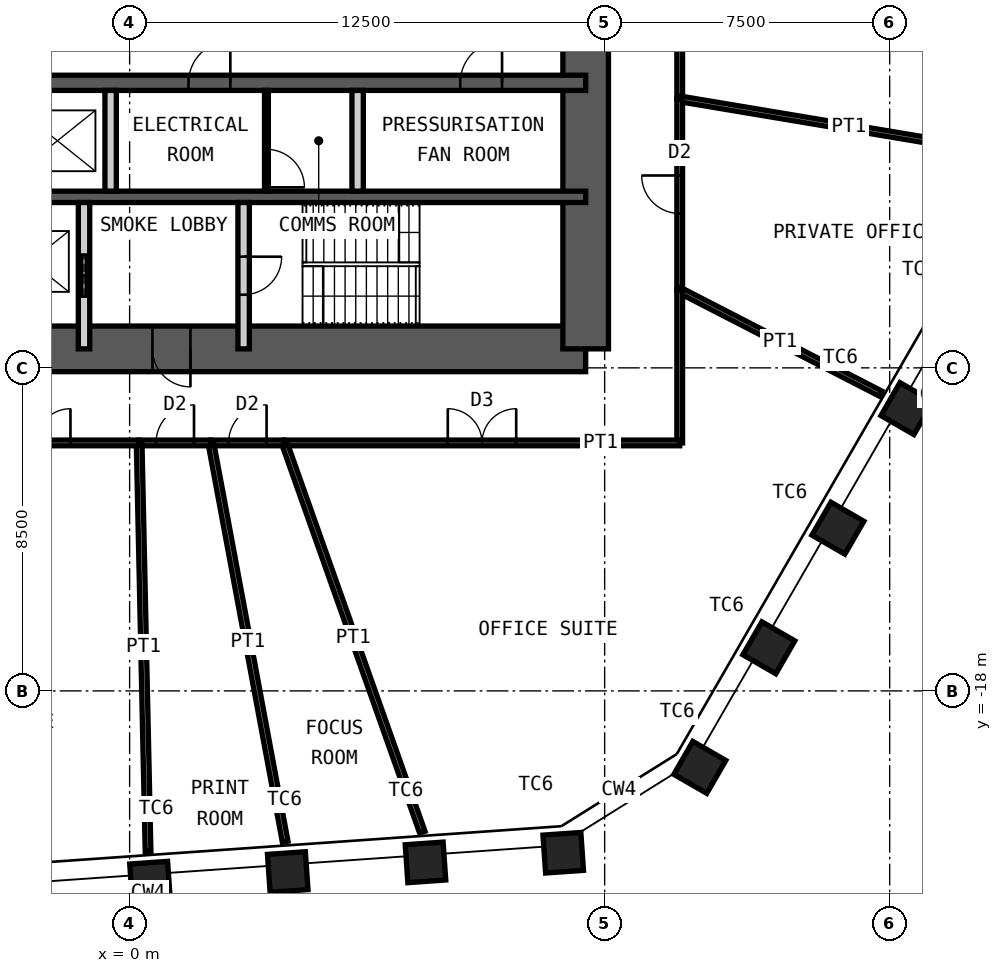
"""IFC4 building model, lengths in metres.
Left out: names, types, materials, properties, quantities, classifications, styles, units other than length and angle.
Written with IfcOpenShell. Run it as: python <this file> out.ifc"""

import sys

from ifc_helpers import new_model, si_unit, direction, frame, frame_2d, origin, origin_2d, place, context, subcontext, project, spatial, rectangle, hollow_rectangle, extrude, element, fill, save


model = new_model("IFC4")
c1 = context("Model", 3, precision=1e-05, world=origin(), true_north=direction((0.0, 1.0)))
c2 = subcontext(c1, "Body", "Model", "MODEL_VIEW")
j1 = project(units=[si_unit("LENGTHUNIT", "METRE"), si_unit("PLANEANGLEUNIT", "RADIAN")], contexts=[c1])
p1 = place(None, origin())
s1 = spatial("IfcSite", under=j1, at=p1, CompositionType="ELEMENT")
p2 = place(p1, origin())
s2 = spatial("IfcBuilding", under=s1, at=p2, CompositionType="ELEMENT")
p3 = place(p2, frame((0.0, 0.0, 222.4)))
s3 = spatial("IfcBuildingStorey", under=s2, at=p3, CompositionType="ELEMENT", Elevation=222.4)
for number, where, z_axis, x_axis in (
    (1, (20.454, -10.572, 0.0), (0.0, 0.0, 1.0), (0.5, 0.866, 0.0)),
    (2, (18.637, -13.719, 0.0), (0.0, 0.0, 1.0), (0.5, 0.866, 0.0)),
    (3, (16.821, -16.866, 0.0), (0.0, 0.0, 1.0), (0.5, 0.866, 0.0)),
    (4, (15.004, -20.012, 0.0), (0.0, 0.0, 1.0), (0.5, 0.866, 0.0)),
    (5, (11.41, -22.258, 0.0), (0.0, 0.0, 1.0), (0.998, 0.07, 0.0)),
    (6, (7.785, -22.512, 0.0), (0.0, 0.0, 1.0), (0.998, 0.07, 0.0)),
    (7, (4.16, -22.765, 0.0), (0.0, 0.0, 1.0), (0.998, 0.07, 0.0)),
    (8, (0.536, -23.019, 0.0), (0.0, 0.0, 1.0), (0.998, 0.07, 0.0)),
):
    element("IfcColumn", number, at=place(p3, frame(where, z_axis=z_axis, x_axis=x_axis)), inside=s3, PredefinedType="COLUMN", context=c2, shape_type="SweptSolid", body=[
        extrude(hollow_rectangle(XDim=1.0, YDim=1.0, WallThickness=0.06, at=origin_2d()), origin(), (0.0, 0.0, 1.0), 4.2),
    ])
p4 = place(p3, frame((-12.0, -9.0, 0.0), z_axis=(0.0, 0.0, 1.0), x_axis=(1.0, 0.0, 0.0)))
e9 = element("IfcWall", 9, at=p4, inside=s3, PredefinedType="SHEAR", context=c2, shape_type="SweptSolid", body=[
    extrude(rectangle(XDim=24.0, YDim=1.2, at=frame_2d((12.0, 0.0))), origin(), (0.0, 0.0, 1.0), 4.2),
])
p5 = place(p4, frame((1.35, 0.0, 0.0)))
e10 = element("IfcOpeningElement", 10, at=p5, cuts=e9, PredefinedType="OPENING", context=c2, shape_type="SweptSolid", body=[
    extrude(rectangle(XDim=1.0, YDim=2.1, at=frame_2d((0.5, 1.05))), frame((0.0, 0.61, 0.0), z_axis=(0.0, -1.0, 0.0), x_axis=(1.0, 0.0, 0.0)), (0.0, 0.0, 1.0), 1.22),
])
p6 = place(p4, frame((5.325, 0.0, 0.0)))
e11 = element("IfcOpeningElement", 11, at=p6, cuts=e9, PredefinedType="OPENING", context=c2, shape_type="SweptSolid", body=[
    extrude(rectangle(XDim=1.15, YDim=2.1, at=frame_2d((0.575, 1.05))), frame((0.0, 0.61, 0.0), z_axis=(0.0, -1.0, 0.0), x_axis=(1.0, 0.0, 0.0)), (0.0, 0.0, 1.0), 1.22),
])
p7 = place(p4, frame((12.6, 0.0, 0.0)))
e12 = element("IfcOpeningElement", 12, at=p7, cuts=e9, PredefinedType="OPENING", context=c2, shape_type="SweptSolid", body=[
    extrude(rectangle(XDim=1.0, YDim=2.1, at=frame_2d((0.5, 1.05))), frame((0.0, 0.61, 0.0), z_axis=(0.0, -1.0, 0.0), x_axis=(1.0, 0.0, 0.0)), (0.0, 0.0, 1.0), 1.22),
])
p8 = place(p3, frame((12.0, -9.0, 0.0), z_axis=(0.0, 0.0, 1.0), x_axis=(0.0, 1.0, 0.0)))
e13 = element("IfcWall", 13, at=p8, inside=s3, PredefinedType="SHEAR", context=c2, shape_type="SweptSolid", body=[
    extrude(rectangle(XDim=18.0, YDim=1.2, at=frame_2d((9.0, 0.0))), origin(), (0.0, 0.0, 1.0), 4.2),
])
p9 = place(p8, frame((8.1, 0.0, 0.0)))
e14 = element("IfcOpeningElement", 14, at=p9, cuts=e13, PredefinedType="OPENING", context=c2, shape_type="SweptSolid", body=[
    extrude(rectangle(XDim=1.8, YDim=2.1, at=frame_2d((0.9, 1.05))), frame((0.0, 0.61, 0.0), z_axis=(0.0, -1.0, 0.0), x_axis=(1.0, 0.0, 0.0)), (0.0, 0.0, 1.0), 1.22),
])
p10 = place(p3, frame((-12.0, -2.0, 0.0), z_axis=(0.0, 0.0, 1.0), x_axis=(1.0, 0.0, 0.0)))
e15 = element("IfcWall", 15, at=p10, inside=s3, PredefinedType="SHEAR", context=c2, shape_type="SweptSolid", body=[
    extrude(rectangle(XDim=24.0, YDim=0.4, at=frame_2d((12.0, 0.0))), origin(), (0.0, 0.0, 1.0), 4.2),
])
p11 = place(p10, frame((1.1, 0.0, 0.0)))
e16 = element("IfcOpeningElement", 16, at=p11, cuts=e15, PredefinedType="OPENING", context=c2, shape_type="SweptSolid", body=[
    extrude(rectangle(XDim=1.1, YDim=2.1, at=frame_2d((0.55, 1.05))), frame((0.0, 0.21, 0.0), z_axis=(0.0, -1.0, 0.0), x_axis=(1.0, 0.0, 0.0)), (0.0, 0.0, 1.0), 0.42),
])
p12 = place(p10, frame((13.55, 0.0, 0.0)))
e17 = element("IfcOpeningElement", 17, at=p12, cuts=e15, PredefinedType="OPENING", context=c2, shape_type="SweptSolid", body=[
    extrude(rectangle(XDim=1.1, YDim=2.1, at=frame_2d((0.55, 1.05))), frame((0.0, 0.21, 0.0), z_axis=(0.0, -1.0, 0.0), x_axis=(1.0, 0.0, 0.0)), (0.0, 0.0, 1.0), 0.42),
])
p13 = place(p10, frame((20.7, 0.0, 0.0)))
e18 = element("IfcOpeningElement", 18, at=p13, cuts=e15, PredefinedType="OPENING", context=c2, shape_type="SweptSolid", body=[
    extrude(rectangle(XDim=1.1, YDim=2.1, at=frame_2d((0.55, 1.05))), frame((0.0, 0.21, 0.0), z_axis=(0.0, -1.0, 0.0), x_axis=(1.0, 0.0, 0.0)), (0.0, 0.0, 1.0), 0.42),
])
p14 = place(p10, frame((4.0, 0.0, 0.0)))
e19 = element("IfcOpeningElement", 19, at=p14, cuts=e15, PredefinedType="OPENING", context=c2, shape_type="SweptSolid", body=[
    extrude(rectangle(XDim=1.0, YDim=2.1, at=frame_2d((0.5, 1.05))), frame((0.0, 0.21, 0.0), z_axis=(0.0, -1.0, 0.0), x_axis=(1.0, 0.0, 0.0)), (0.0, 0.0, 1.0), 0.42),
])
p15 = place(p10, frame((6.8, 0.0, 0.0)))
e20 = element("IfcOpeningElement", 20, at=p15, cuts=e15, PredefinedType="OPENING", context=c2, shape_type="SweptSolid", body=[
    extrude(rectangle(XDim=1.0, YDim=2.1, at=frame_2d((0.5, 1.05))), frame((0.0, 0.21, 0.0), z_axis=(0.0, -1.0, 0.0), x_axis=(1.0, 0.0, 0.0)), (0.0, 0.0, 1.0), 0.42),
])
p16 = place(p3, frame((-12.0, -5.0, 0.0), z_axis=(0.0, 0.0, 1.0), x_axis=(1.0, 0.0, 0.0)))
e21 = element("IfcWall", 21, at=p16, inside=s3, PredefinedType="SHEAR", context=c2, shape_type="SweptSolid", body=[
    extrude(rectangle(XDim=24.0, YDim=0.3, at=frame_2d((12.0, 0.0))), origin(), (0.0, 0.0, 1.0), 4.2),
])
for number, where, z_axis, x_axis in (
    (22, (-0.5, -4.85, 0.0), (0.0, 0.0, 1.0), (0.0, 1.0, 0.0)),
    (23, (6.0, -4.85, 0.0), (0.0, 0.0, 1.0), (0.0, 1.0, 0.0)),
):
    element("IfcWall", number, at=place(p3, frame(where, z_axis=z_axis, x_axis=x_axis)), inside=s3, PredefinedType="PARTITIONING", context=c2, shape_type="SweptSolid", body=[
        extrude(rectangle(XDim=2.65, YDim=0.3, at=frame_2d((1.325, 0.0))), origin(), (0.0, 0.0, 1.0), 3.98),
    ])
p17 = place(p3, frame((-1.2, -9.0, 0.0), z_axis=(0.0, 0.0, 1.0), x_axis=(0.0, 1.0, 0.0)))
e24 = element("IfcWall", 24, at=p17, inside=s3, PredefinedType="PARTITIONING", context=c2, shape_type="SweptSolid", body=[
    extrude(rectangle(XDim=3.85, YDim=0.3, at=frame_2d((1.925, 0.0))), origin(), (0.0, 0.0, 1.0), 3.98),
])
p18 = place(p17, frame((1.375, 0.0, 0.0)))
e25 = element("IfcOpeningElement", 25, at=p18, cuts=e24, PredefinedType="OPENING", context=c2, shape_type="SweptSolid", body=[
    extrude(rectangle(XDim=1.1, YDim=2.4, at=frame_2d((0.55, 1.2))), frame((0.0, 0.16, 0.0), z_axis=(0.0, -1.0, 0.0), x_axis=(1.0, 0.0, 0.0)), (0.0, 0.0, 1.0), 0.32),
])
p19 = place(p3, frame((3.0, -9.0, 0.0), z_axis=(0.0, 0.0, 1.0), x_axis=(0.0, 1.0, 0.0)))
e26 = element("IfcWall", 26, at=p19, inside=s3, PredefinedType="PARTITIONING", context=c2, shape_type="SweptSolid", body=[
    extrude(rectangle(XDim=3.85, YDim=0.3, at=frame_2d((1.925, 0.0))), origin(), (0.0, 0.0, 1.0), 3.98),
])
p20 = place(p19, frame((1.425, 0.0, 0.0)))
e27 = element("IfcOpeningElement", 27, at=p20, cuts=e26, PredefinedType="OPENING", context=c2, shape_type="SweptSolid", body=[
    extrude(rectangle(XDim=1.0, YDim=2.1, at=frame_2d((0.5, 1.05))), frame((0.0, 0.16, 0.0), z_axis=(0.0, -1.0, 0.0), x_axis=(1.0, 0.0, 0.0)), (0.0, 0.0, 1.0), 0.32),
])
p21 = place(p3, frame((3.6, -4.85, 0.0), z_axis=(0.0, 0.0, 1.0), x_axis=(0.0, 1.0, 0.0)))
e28 = element("IfcWall", 28, at=p21, inside=s3, PredefinedType="PARTITIONING", context=c2, shape_type="SweptSolid", body=[
    extrude(rectangle(XDim=2.65, YDim=0.1, at=frame_2d((1.325, 0.0))), origin(), (0.0, 0.0, 1.0), 3.98),
])
p22 = place(p21, frame((0.1, 0.0, 0.0)))
e29 = element("IfcOpeningElement", 29, at=p22, cuts=e28, PredefinedType="OPENING", context=c2, shape_type="SweptSolid", body=[
    extrude(rectangle(XDim=1.0, YDim=2.4, at=frame_2d((0.5, 1.2))), frame((0.0, 0.06, 0.0), z_axis=(0.0, -1.0, 0.0), x_axis=(1.0, 0.0, 0.0)), (0.0, 0.0, 1.0), 0.12),
])
p23 = place(p3, frame((14.475, 3.475, 0.0), z_axis=(0.0, 0.0, 1.0), x_axis=(0.0, -1.0, 0.0)))
e30 = element("IfcWall", 30, at=p23, inside=s3, PredefinedType="PARTITIONING", context=c2, shape_type="SweptSolid", body=[
    extrude(rectangle(XDim=5.896, YDim=0.15, at=frame_2d((2.948, 0.0))), origin(), (0.0, 0.0, 1.0), 4.03),
])
p24 = place(p23, frame((2.448, 0.0, 0.0)))
e31 = element("IfcOpeningElement", 31, at=p24, cuts=e30, PredefinedType="OPENING", context=c2, shape_type="SweptSolid", body=[
    extrude(rectangle(XDim=1.0, YDim=2.4, at=frame_2d((0.5, 1.2))), frame((0.0, 0.085, 0.0), z_axis=(0.0, -1.0, 0.0), x_axis=(1.0, 0.0, 0.0)), (0.0, 0.0, 1.0), 0.17),
])
p25 = place(p3, frame((23.383, -3.912, 0.0), z_axis=(0.0, 0.0, 1.0), x_axis=(-0.986293651891, 0.164999491631, 0.0)))
e32 = element("IfcWall", 32, at=p25, inside=s3, PredefinedType="PARTITIONING", context=c2, shape_type="SweptSolid", body=[
    extrude(rectangle(XDim=9.032, YDim=0.15, at=frame_2d((4.516, 0.0))), origin(), (0.0, 0.0, 1.0), 3.43),
])
p26 = place(p3, frame((14.475, -2.422, 0.0), z_axis=(0.0, 0.0, 1.0), x_axis=(0.0, -1.0, 0.0)))
e33 = element("IfcWall", 33, at=p26, inside=s3, PredefinedType="PARTITIONING", context=c2, shape_type="SweptSolid", body=[
    extrude(rectangle(XDim=5.033, YDim=0.15, at=frame_2d((2.517, 0.0))), origin(), (0.0, 0.0, 1.0), 4.03),
])
p27 = place(p26, frame((2.017, 0.0, 0.0)))
e34 = element("IfcOpeningElement", 34, at=p27, cuts=e33, PredefinedType="OPENING", context=c2, shape_type="SweptSolid", body=[
    extrude(rectangle(XDim=1.0, YDim=2.4, at=frame_2d((0.5, 1.2))), frame((0.0, 0.085, 0.0), z_axis=(0.0, -1.0, 0.0), x_axis=(1.0, 0.0, 0.0)), (0.0, 0.0, 1.0), 0.17),
])
p28 = place(p3, frame((19.759, -10.177, 0.0), z_axis=(0.0, 0.0, 1.0), x_axis=(-0.889015092721, 0.457877893017, 0.0)))
e35 = element("IfcWall", 35, at=p28, inside=s3, PredefinedType="PARTITIONING", context=c2, shape_type="SweptSolid", body=[
    extrude(rectangle(XDim=5.944, YDim=0.15, at=frame_2d((2.972, 0.0))), origin(), (0.0, 0.0, 1.0), 3.43),
])
p29 = place(p3, frame((14.475, -7.455, 0.0), z_axis=(0.0, 0.0, 1.0), x_axis=(0.0, -1.0, 0.0)))
e36 = element("IfcWall", 36, at=p29, inside=s3, PredefinedType="PARTITIONING", context=c2, shape_type="SweptSolid", body=[
    extrude(rectangle(XDim=4.02, YDim=0.15, at=frame_2d((2.01, 0.0))), origin(), (0.0, 0.0, 1.0), 4.03),
])
p30 = place(p3, frame((14.475, -11.475, 0.0), z_axis=(0.0, 0.0, 1.0), x_axis=(-1.0, 0.0, 0.0)))
e37 = element("IfcWall", 37, at=p30, inside=s3, PredefinedType="PARTITIONING", context=c2, shape_type="SweptSolid", body=[
    extrude(rectangle(XDim=10.406, YDim=0.15, at=frame_2d((5.203, 0.0))), origin(), (0.0, 0.0, 1.0), 4.03),
])
p31 = place(p30, frame((4.303, 0.0, 0.0)))
e38 = element("IfcOpeningElement", 38, at=p31, cuts=e37, PredefinedType="OPENING", context=c2, shape_type="SweptSolid", body=[
    extrude(rectangle(XDim=1.8, YDim=2.4, at=frame_2d((0.9, 1.2))), frame((0.0, 0.085, 0.0), z_axis=(0.0, -1.0, 0.0), x_axis=(1.0, 0.0, 0.0)), (0.0, 0.0, 1.0), 0.17),
])
p32 = place(p3, frame((7.703, -21.719, 0.0), z_axis=(0.0, 0.0, 1.0), x_axis=(-0.334269551553, 0.942477515331, 0.0)))
e39 = element("IfcWall", 39, at=p32, inside=s3, PredefinedType="PARTITIONING", context=c2, shape_type="SweptSolid", body=[
    extrude(rectangle(XDim=10.869, YDim=0.15, at=frame_2d((5.435, 0.0))), origin(), (0.0, 0.0, 1.0), 3.43),
])
p33 = place(p3, frame((4.07, -11.475, 0.0), z_axis=(0.0, 0.0, 1.0), x_axis=(-1.0, 0.0, 0.0)))
e40 = element("IfcWall", 40, at=p33, inside=s3, PredefinedType="PARTITIONING", context=c2, shape_type="SweptSolid", body=[
    extrude(rectangle(XDim=1.932, YDim=0.15, at=frame_2d((0.966, 0.0))), origin(), (0.0, 0.0, 1.0), 4.03),
])
p34 = place(p33, frame((0.466, 0.0, 0.0)))
e41 = element("IfcOpeningElement", 41, at=p34, cuts=e40, PredefinedType="OPENING", context=c2, shape_type="SweptSolid", body=[
    extrude(rectangle(XDim=1.0, YDim=2.4, at=frame_2d((0.5, 1.2))), frame((0.0, 0.085, 0.0), z_axis=(0.0, -1.0, 0.0), x_axis=(1.0, 0.0, 0.0)), (0.0, 0.0, 1.0), 0.17),
])
p35 = place(p3, frame((4.093, -21.969, 0.0), z_axis=(0.0, 0.0, 1.0), x_axis=(-0.183180901121, 0.983079222374, 0.0)))
e42 = element("IfcWall", 42, at=p35, inside=s3, PredefinedType="PARTITIONING", context=c2, shape_type="SweptSolid", body=[
    extrude(rectangle(XDim=10.674, YDim=0.15, at=frame_2d((5.337, 0.0))), origin(), (0.0, 0.0, 1.0), 3.43),
])
p36 = place(p3, frame((2.138, -11.475, 0.0), z_axis=(0.0, 0.0, 1.0), x_axis=(-1.0, 0.0, 0.0)))
e43 = element("IfcWall", 43, at=p36, inside=s3, PredefinedType="PARTITIONING", context=c2, shape_type="SweptSolid", body=[
    extrude(rectangle(XDim=1.888, YDim=0.15, at=frame_2d((0.944, 0.0))), origin(), (0.0, 0.0, 1.0), 4.03),
])
p37 = place(p36, frame((0.444, 0.0, 0.0)))
e44 = element("IfcOpeningElement", 44, at=p37, cuts=e43, PredefinedType="OPENING", context=c2, shape_type="SweptSolid", body=[
    extrude(rectangle(XDim=1.0, YDim=2.4, at=frame_2d((0.5, 1.2))), frame((0.0, 0.085, 0.0), z_axis=(0.0, -1.0, 0.0), x_axis=(1.0, 0.0, 0.0)), (0.0, 0.0, 1.0), 0.17),
])
p38 = place(p3, frame((0.485, -22.22, 0.0), z_axis=(0.0, 0.0, 1.0), x_axis=(-0.021806550804, 0.999762208899, 0.0)))
e45 = element("IfcWall", 45, at=p38, inside=s3, PredefinedType="PARTITIONING", context=c2, shape_type="SweptSolid", body=[
    extrude(rectangle(XDim=10.748, YDim=0.15, at=frame_2d((5.374, 0.0))), origin(), (0.0, 0.0, 1.0), 3.43),
])
p39 = place(p3, frame((0.25, -11.475, 0.0), z_axis=(0.0, 0.0, 1.0), x_axis=(-1.0, 0.0, 0.0)))
e46 = element("IfcWall", 46, at=p39, inside=s3, PredefinedType="PARTITIONING", context=c2, shape_type="SweptSolid", body=[
    extrude(rectangle(XDim=5.415, YDim=0.15, at=frame_2d((2.707, 0.0))), origin(), (0.0, 0.0, 1.0), 4.03),
])
p40 = place(p39, frame((1.807, 0.0, 0.0)))
e47 = element("IfcOpeningElement", 47, at=p40, cuts=e46, PredefinedType="OPENING", context=c2, shape_type="SweptSolid", body=[
    extrude(rectangle(XDim=1.8, YDim=2.4, at=frame_2d((0.9, 1.2))), frame((0.0, 0.085, 0.0), z_axis=(0.0, -1.0, 0.0), x_axis=(1.0, 0.0, 0.0)), (0.0, 0.0, 1.0), 0.17),
])
p41 = place(p7, origin())
e48 = element("IfcDoor", 48, at=p41, inside=s3, OperationType="SINGLE_SWING_RIGHT", PredefinedType="DOOR", context=c2, shape_type="SweptSolid", body=[
    extrude(rectangle(XDim=1.0, YDim=2.1, at=frame_2d((0.5, 1.05))), frame((0.0, 0.025, 0.0), z_axis=(0.0, -1.0, 0.0), x_axis=(1.0, 0.0, 0.0)), (0.0, 0.0, 1.0), 0.05),
])
fill(e12, e48)
p42 = place(p20, origin())
e49 = element("IfcDoor", 49, at=p42, inside=s3, OperationType="SINGLE_SWING_RIGHT", PredefinedType="DOOR", context=c2, shape_type="SweptSolid", body=[
    extrude(rectangle(XDim=1.0, YDim=2.1, at=frame_2d((0.5, 1.05))), frame((0.0, 0.025, 0.0), z_axis=(0.0, -1.0, 0.0), x_axis=(1.0, 0.0, 0.0)), (0.0, 0.0, 1.0), 0.05),
])
fill(e27, e49)
p43 = place(p12, origin())
e50 = element("IfcDoor", 50, at=p43, inside=s3, OperationType="SINGLE_SWING_LEFT", PredefinedType="DOOR", context=c2, shape_type="SweptSolid", body=[
    extrude(rectangle(XDim=1.1, YDim=2.1, at=frame_2d((0.55, 1.05))), frame((0.0, 0.025, 0.0), z_axis=(0.0, -1.0, 0.0), x_axis=(1.0, 0.0, 0.0)), (0.0, 0.0, 1.0), 0.05),
])
fill(e17, e50)
p44 = place(p13, origin())
e51 = element("IfcDoor", 51, at=p44, inside=s3, OperationType="SINGLE_SWING_LEFT", PredefinedType="DOOR", context=c2, shape_type="SweptSolid", body=[
    extrude(rectangle(XDim=1.1, YDim=2.1, at=frame_2d((0.55, 1.05))), frame((0.0, 0.025, 0.0), z_axis=(0.0, -1.0, 0.0), x_axis=(1.0, 0.0, 0.0)), (0.0, 0.0, 1.0), 0.05),
])
fill(e18, e51)
p45 = place(p18, origin())
e52 = element("IfcDoor", 52, at=p45, inside=s3, OperationType="DOUBLE_DOOR_SLIDING", PredefinedType="DOOR", context=c2, shape_type="SweptSolid", body=[
    extrude(rectangle(XDim=1.1, YDim=2.4, at=frame_2d((0.55, 1.2))), frame((0.0, 0.025, 0.0), z_axis=(0.0, -1.0, 0.0), x_axis=(1.0, 0.0, 0.0)), (0.0, 0.0, 1.0), 0.05),
])
fill(e25, e52)
p46 = place(p22, origin())
e53 = element("IfcDoor", 53, at=p46, inside=s3, OperationType="SINGLE_SWING_LEFT", PredefinedType="DOOR", context=c2, shape_type="SweptSolid", body=[
    extrude(rectangle(XDim=1.0, YDim=2.4, at=frame_2d((0.5, 1.2))), frame((0.0, 0.025, 0.0), z_axis=(0.0, -1.0, 0.0), x_axis=(1.0, 0.0, 0.0)), (0.0, 0.0, 1.0), 0.05),
])
fill(e29, e53)
p47 = place(p27, origin())
e54 = element("IfcDoor", 54, at=p47, inside=s3, OperationType="SINGLE_SWING_LEFT", PredefinedType="DOOR", context=c2, shape_type="SweptSolid", body=[
    extrude(rectangle(XDim=1.0, YDim=2.4, at=frame_2d((0.5, 1.2))), frame((0.0, 0.025, 0.0), z_axis=(0.0, -1.0, 0.0), x_axis=(1.0, 0.0, 0.0)), (0.0, 0.0, 1.0), 0.05),
])
fill(e34, e54)
p48 = place(p31, origin())
e55 = element("IfcDoor", 55, at=p48, inside=s3, OperationType="DOUBLE_DOOR_DOUBLE_SWING", PredefinedType="DOOR", context=c2, shape_type="SweptSolid", body=[
    extrude(rectangle(XDim=1.8, YDim=2.4, at=frame_2d((0.9, 1.2))), frame((0.0, 0.025, 0.0), z_axis=(0.0, -1.0, 0.0), x_axis=(1.0, 0.0, 0.0)), (0.0, 0.0, 1.0), 0.05),
])
fill(e38, e55)
p49 = place(p34, origin())
e56 = element("IfcDoor", 56, at=p49, inside=s3, OperationType="SINGLE_SWING_LEFT", PredefinedType="DOOR", context=c2, shape_type="SweptSolid", body=[
    extrude(rectangle(XDim=1.0, YDim=2.4, at=frame_2d((0.5, 1.2))), frame((0.0, 0.025, 0.0), z_axis=(0.0, -1.0, 0.0), x_axis=(1.0, 0.0, 0.0)), (0.0, 0.0, 1.0), 0.05),
])
fill(e41, e56)
p50 = place(p37, origin())
e57 = element("IfcDoor", 57, at=p50, inside=s3, OperationType="SINGLE_SWING_LEFT", PredefinedType="DOOR", context=c2, shape_type="SweptSolid", body=[
    extrude(rectangle(XDim=1.0, YDim=2.4, at=frame_2d((0.5, 1.2))), frame((0.0, 0.025, 0.0), z_axis=(0.0, -1.0, 0.0), x_axis=(1.0, 0.0, 0.0)), (0.0, 0.0, 1.0), 0.05),
])
fill(e44, e57)
p51 = place(p40, origin())
e58 = element("IfcDoor", 58, at=p51, inside=s3, OperationType="DOUBLE_DOOR_DOUBLE_SWING", PredefinedType="DOOR", context=c2, shape_type="SweptSolid", body=[
    extrude(rectangle(XDim=1.8, YDim=2.4, at=frame_2d((0.9, 1.2))), frame((0.0, 0.025, 0.0), z_axis=(0.0, -1.0, 0.0), x_axis=(1.0, 0.0, 0.0)), (0.0, 0.0, 1.0), 0.05),
])
fill(e47, e58)
save(model, sys.argv[1])
